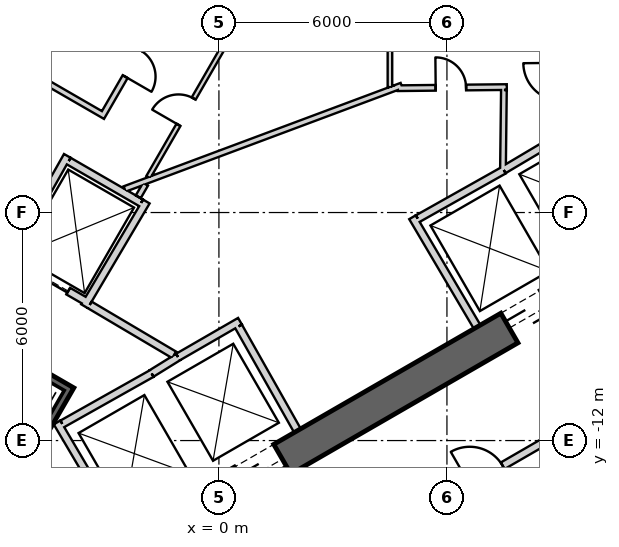
"""IFC4 building model, lengths in metres.
Left out: names, types, materials, properties, quantities, classifications, styles, units other than length and angle.
Written with IfcOpenShell. Run it as: python <this file> out.ifc"""

import sys

from ifc_helpers import new_model, si_unit, direction, frame, frame_2d, origin, place, context, subcontext, project, spatial, rectangle, extrude, element, fill, save


model = new_model("IFC4")
c1 = context("Model", 3, precision=1e-05, world=origin(), true_north=direction((0.0, 1.0)))
c2 = subcontext(c1, "Body", "Model", "MODEL_VIEW")
j1 = project(units=[si_unit("LENGTHUNIT", "METRE"), si_unit("PLANEANGLEUNIT", "RADIAN")], contexts=[c1])
p1 = place(None, origin())
s1 = spatial("IfcSite", under=j1, at=p1, CompositionType="ELEMENT")
p2 = place(p1, origin())
s2 = spatial("IfcBuilding", under=s1, at=p2, CompositionType="ELEMENT")
p3 = place(p2, frame((0.0, 0.0, 404.8)))
s3 = spatial("IfcBuildingStorey", under=s2, at=p3, CompositionType="ELEMENT", Elevation=404.8)
p4 = place(p3, frame((-7.825, -17.97, 0.0), z_axis=(0.0, 0.0, 1.0), x_axis=(0.866028369851, 0.499994862586, 0.0)))
e1 = element("IfcWall", 1, at=p4, inside=s3, PredefinedType="SHEAR", context=c2, shape_type="SweptSolid", body=[
    extrude(rectangle(XDim=31.523, YDim=0.9, at=frame_2d((15.762, 0.0))), origin(), (0.0, 0.0, 1.0), 5.5),
])
p5 = place(p4, frame((7.062, 0.0, 0.0)))
e2 = element("IfcOpeningElement", 2, at=p5, cuts=e1, PredefinedType="OPENING", context=c2, shape_type="SweptSolid", body=[
    extrude(rectangle(XDim=1.2, YDim=2.4, at=frame_2d((0.6, 1.2))), frame((0.0, 0.46, 0.0), z_axis=(0.0, -1.0, 0.0), x_axis=(1.0, 0.0, 0.0)), (0.0, 0.0, 1.0), 0.92),
])
p6 = place(p4, frame((9.762, 0.0, 0.0)))
e3 = element("IfcOpeningElement", 3, at=p6, cuts=e1, PredefinedType="OPENING", context=c2, shape_type="SweptSolid", body=[
    extrude(rectangle(XDim=1.2, YDim=2.4, at=frame_2d((0.6, 1.2))), frame((0.0, 0.46, 0.0), z_axis=(0.0, -1.0, 0.0), x_axis=(1.0, 0.0, 0.0)), (0.0, 0.0, 1.0), 0.92),
])
p7 = place(p4, frame((17.862, 0.0, 0.0)))
e4 = element("IfcOpeningElement", 4, at=p7, cuts=e1, PredefinedType="OPENING", context=c2, shape_type="SweptSolid", body=[
    extrude(rectangle(XDim=1.2, YDim=2.4, at=frame_2d((0.6, 1.2))), frame((0.0, 0.46, 0.0), z_axis=(0.0, -1.0, 0.0), x_axis=(1.0, 0.0, 0.0)), (0.0, 0.0, 1.0), 0.92),
])
p8 = place(p4, frame((20.562, 0.0, 0.0)))
e5 = element("IfcOpeningElement", 5, at=p8, cuts=e1, PredefinedType="OPENING", context=c2, shape_type="SweptSolid", body=[
    extrude(rectangle(XDim=1.2, YDim=2.4, at=frame_2d((0.6, 1.2))), frame((0.0, 0.46, 0.0), z_axis=(0.0, -1.0, 0.0), x_axis=(1.0, 0.0, 0.0)), (0.0, 0.0, 1.0), 0.92),
])
p9 = place(p4, frame((26.712, 0.0, 0.0)))
e6 = element("IfcOpeningElement", 6, at=p9, cuts=e1, PredefinedType="OPENING", context=c2, shape_type="SweptSolid", body=[
    extrude(rectangle(XDim=1.2, YDim=2.4, at=frame_2d((0.6, 1.2))), frame((0.0, 0.46, 0.0), z_axis=(0.0, -1.0, 0.0), x_axis=(1.0, 0.0, 0.0)), (0.0, 0.0, 1.0), 0.92),
])
p10 = place(p4, frame((3.612, 0.0, 0.0)))
e7 = element("IfcOpeningElement", 7, at=p10, cuts=e1, PredefinedType="OPENING", context=c2, shape_type="SweptSolid", body=[
    extrude(rectangle(XDim=1.2, YDim=2.4, at=frame_2d((0.6, 1.2))), frame((0.0, 0.46, 0.0), z_axis=(0.0, -1.0, 0.0), x_axis=(1.0, 0.0, 0.0)), (0.0, 0.0, 1.0), 0.92),
])
p11 = place(p3, frame((-2.558, -14.409, 0.0), z_axis=(0.0, 0.0, 1.0), x_axis=(-0.507997497166, 0.861358544901, 0.0)))
e8 = element("IfcWall", 8, at=p11, inside=s3, PredefinedType="PLUMBINGWALL", context=c2, shape_type="SweptSolid", body=[
    extrude(rectangle(XDim=3.35, YDim=0.2, at=frame_2d((1.675, 0.0))), origin(), (0.0, 0.0, 1.0), 5.25),
])
p12 = place(p3, frame((-1.769, -10.237, 0.0), z_axis=(0.0, 0.0, 1.0), x_axis=(-0.871534483978, -0.490334215854, 0.0)))
e9 = element("IfcWall", 9, at=p12, inside=s3, PredefinedType="PLUMBINGWALL", context=c2, shape_type="SweptSolid", body=[
    extrude(rectangle(XDim=2.7, YDim=0.2, at=frame_2d((1.35, 0.0))), origin(), (0.0, 0.0, 1.0), 5.25),
])
p13 = place(p3, frame((-1.076, -9.803, 0.0), z_axis=(0.0, 0.0, 1.0), x_axis=(-0.850341601995, -0.526231089842, 0.0)))
e10 = element("IfcWall", 10, at=p13, inside=s3, PredefinedType="PLUMBINGWALL", context=c2, shape_type="SweptSolid", body=[
    extrude(rectangle(XDim=0.817, YDim=0.2, at=frame_2d((0.408, 0.0))), origin(), (0.0, 0.0, 1.0), 5.25),
])
p14 = place(p3, frame((-1.077, -9.802, 0.0), z_axis=(0.0, 0.0, 1.0), x_axis=(0.865993522811, 0.500055215401, 0.0)))
e11 = element("IfcWall", 11, at=p14, inside=s3, PredefinedType="PLUMBINGWALL", context=c2, shape_type="SweptSolid", body=[
    extrude(rectangle(XDim=1.884, YDim=0.2, at=frame_2d((0.942, 0.0))), origin(), (0.0, 0.0, 1.0), 5.25),
])
p15 = place(p3, frame((0.517, -8.997, 0.0), z_axis=(0.0, 0.0, 1.0), x_axis=(0.491993409184, -0.87059892334, 0.0)))
e12 = element("IfcWall", 12, at=p15, inside=s3, PredefinedType="PLUMBINGWALL", context=c2, shape_type="SweptSolid", body=[
    extrude(rectangle(XDim=3.15, YDim=0.2, at=frame_2d((1.575, 0.0))), origin(), (0.0, 0.0, 1.0), 5.25),
])
p16 = place(p3, frame((6.795, -9.01, 0.0), z_axis=(0.0, 0.0, 1.0), x_axis=(-0.507997497166, 0.861358544901, 0.0)))
e13 = element("IfcWall", 13, at=p16, inside=s3, PredefinedType="PLUMBINGWALL", context=c2, shape_type="SweptSolid", body=[
    extrude(rectangle(XDim=3.35, YDim=0.2, at=frame_2d((1.675, 0.0))), origin(), (0.0, 0.0, 1.0), 5.25),
])
p17 = place(p3, frame((5.231, -6.161, 0.0), z_axis=(0.0, 0.0, 1.0), x_axis=(0.871540428464, 0.4903236498, 0.0)))
e14 = element("IfcWall", 14, at=p17, inside=s3, PredefinedType="PLUMBINGWALL", context=c2, shape_type="SweptSolid", body=[
    extrude(rectangle(XDim=2.6, YDim=0.2, at=frame_2d((1.3, 0.0))), origin(), (0.0, 0.0, 1.0), 5.25),
])
p18 = place(p3, frame((7.493, -4.878, 0.0), z_axis=(0.0, 0.0, 1.0), x_axis=(0.859981807212, 0.510324691999, 0.0)))
e15 = element("IfcWall", 15, at=p18, inside=s3, PredefinedType="PLUMBINGWALL", context=c2, shape_type="SweptSolid", body=[
    extrude(rectangle(XDim=1.845, YDim=0.2, at=frame_2d((0.922, 0.0))), origin(), (0.0, 0.0, 1.0), 5.25),
])
p19 = place(p3, frame((-3.905, -10.563, -0.3), z_axis=(0.0, 0.0, 1.0), x_axis=(-0.500012932018, -0.866017937352, 0.0)))
e16 = element("IfcWall", 16, at=p19, inside=s3, PredefinedType="SHEAR", context=c2, shape_type="SweptSolid", body=[
    extrude(rectangle(XDim=8.1, YDim=0.2, at=frame_2d((4.05, 0.0))), origin(), (0.0, 0.0, 1.0), 5.55),
])
p20 = place(p3, frame((-4.041, -10.599, -0.3), z_axis=(0.0, 0.0, 1.0), x_axis=(-0.866047807691, 0.499961193289, 0.0)))
e17 = element("IfcWall", 17, at=p20, inside=s3, PredefinedType="SHEAR", context=c2, shape_type="SweptSolid", body=[
    extrude(rectangle(XDim=3.6, YDim=0.2, at=frame_2d((1.8, 0.0))), origin(), (0.0, 0.0, 1.0), 5.55),
])
p21 = place(p20, frame((1.25, 0.0, 0.3)))
e18 = element("IfcOpeningElement", 18, at=p21, cuts=e17, PredefinedType="OPENING", context=c2, shape_type="SweptSolid", body=[
    extrude(rectangle(XDim=1.1, YDim=2.1, at=frame_2d((0.55, 1.05))), frame((0.0, 0.11, 0.0), z_axis=(0.0, -1.0, 0.0), x_axis=(1.0, 0.0, 0.0)), (0.0, 0.0, 1.0), 0.22),
])
p22 = place(p3, frame((-3.446, -8.368, 0.0), z_axis=(0.0, 0.0, 1.0), x_axis=(-0.866024647952, 0.500001309137, 0.0)))
e19 = element("IfcWall", 19, at=p22, inside=s3, PredefinedType="PLUMBINGWALL", context=c2, shape_type="SweptSolid", body=[
    extrude(rectangle(XDim=2.4, YDim=0.2, at=frame_2d((1.2, 0.0))), origin(), (0.0, 0.0, 1.0), 5.25),
])
p23 = place(p22, frame((0.6, 0.0, 0.0)))
e20 = element("IfcOpeningElement", 20, at=p23, cuts=e19, PredefinedType="OPENING", context=c2, shape_type="SweptSolid", body=[
    extrude(rectangle(XDim=1.2, YDim=2.4, at=frame_2d((0.6, 1.2))), frame((0.0, 0.11, 0.0), z_axis=(0.0, -1.0, 0.0), x_axis=(1.0, 0.0, 0.0)), (0.0, 0.0, 1.0), 0.22),
])
p24 = place(p3, frame((-3.953, -4.646, 0.0), z_axis=(0.0, 0.0, 1.0), x_axis=(0.86605622881, -0.499946605688, 0.0)))
e21 = element("IfcWall", 21, at=p24, inside=s3, PredefinedType="PLUMBINGWALL", context=c2, shape_type="SweptSolid", body=[
    extrude(rectangle(XDim=2.2, YDim=0.2, at=frame_2d((1.1, 0.0))), origin(), (0.0, 0.0, 1.0), 5.25),
])
p25 = place(p3, frame((-1.91, -5.71, 0.0), z_axis=(0.0, 0.0, 1.0), x_axis=(-0.508616218331, -0.860993346345, 0.0)))
e22 = element("IfcWall", 22, at=p25, inside=s3, PredefinedType="PLUMBINGWALL", context=c2, shape_type="SweptSolid", body=[
    extrude(rectangle(XDim=3.2, YDim=0.2, at=frame_2d((1.6, 0.0))), origin(), (0.0, 0.0, 1.0), 5.25),
])
p26 = place(p3, frame((-3.99, -4.509, 0.0), z_axis=(0.0, 0.0, 1.0), x_axis=(-0.491358283181, -0.870957540612, 0.0)))
e23 = element("IfcWall", 23, at=p26, inside=s3, PredefinedType="PLUMBINGWALL", context=c2, shape_type="SweptSolid", body=[
    extrude(rectangle(XDim=3.2, YDim=0.2, at=frame_2d((1.6, 0.0))), origin(), (0.0, 0.0, 1.0), 5.25),
])
p27 = place(p3, frame((-3.401, -8.43, 0.0), z_axis=(0.0, 0.0, 1.0), x_axis=(0.860630814782, -0.509229418482, 0.0)))
e24 = element("IfcWall", 24, at=p27, inside=s3, PredefinedType="PARTITIONING", context=c2, shape_type="SweptSolid", body=[
    extrude(rectangle(XDim=2.582, YDim=0.2, at=frame_2d((1.291, 0.0))), origin(), (0.0, 0.0, 1.0), 5.25),
])
p28 = place(p3, frame((4.807, -2.659, 0.0), z_axis=(0.0, 0.0, 1.0), x_axis=(-0.936818342118, -0.349816228714, 0.0)))
e25 = element("IfcWall", 25, at=p28, inside=s3, PredefinedType="PLUMBINGWALL", context=c2, shape_type="SweptSolid", body=[
    extrude(rectangle(XDim=7.78, YDim=0.15, at=frame_2d((3.89, 0.0))), origin(), (0.0, 0.0, 1.0), 5.25),
])
p29 = place(p3, frame((0.182, -1.535, 0.0), z_axis=(0.0, 0.0, 1.0), x_axis=(-0.499988401207, -0.866032100247, 0.0)))
e26 = element("IfcWall", 26, at=p29, inside=s3, PredefinedType="PARTITIONING", context=c2, shape_type="SweptSolid", body=[
    extrude(rectangle(XDim=4.079, YDim=0.12, at=frame_2d((2.04, 0.0))), origin(), (0.0, 0.0, 1.0), 5.25),
])
p30 = place(p29, frame((1.691, 0.0, 0.0)))
e27 = element("IfcOpeningElement", 27, at=p30, cuts=e26, PredefinedType="OPENING", context=c2, shape_type="SweptSolid", body=[
    extrude(rectangle(XDim=0.8, YDim=2.1, at=frame_2d((0.4, 1.05))), frame((0.0, 0.07, 0.0), z_axis=(0.0, -1.0, 0.0), x_axis=(1.0, 0.0, 0.0)), (0.0, 0.0, 1.0), 0.14),
])
p31 = place(p3, frame((4.5, -2.7, 0.0), z_axis=(0.0, 0.0, 1.0), x_axis=(0.0, 1.0, 0.0)))
e28 = element("IfcWall", 28, at=p31, inside=s3, PredefinedType="PARTITIONING", context=c2, shape_type="SweptSolid", body=[
    extrude(rectangle(XDim=1.715, YDim=0.12, at=frame_2d((0.857, 0.0))), origin(), (0.0, 0.0, 1.0), 5.25),
])
p32 = place(p3, frame((-1.932, -5.256, 0.0), z_axis=(0.0, 0.0, 1.0), x_axis=(-0.499777709171, -0.866153705422, 0.0)))
e29 = element("IfcWall", 29, at=p32, inside=s3, PredefinedType="PLUMBINGWALL", context=c2, shape_type="SweptSolid", body=[
    extrude(rectangle(XDim=0.383, YDim=0.15, at=frame_2d((0.191, 0.0))), origin(), (0.0, 0.0, 1.0), 5.25),
])
p33 = place(p3, frame((7.575, -2.699, 0.0), z_axis=(0.0, 0.0, 1.0), x_axis=(-0.999947791603, -0.010218320275, 0.0)))
e30 = element("IfcWall", 30, at=p33, inside=s3, PredefinedType="PLUMBINGWALL", context=c2, shape_type="SweptSolid", body=[
    extrude(rectangle(XDim=2.867, YDim=0.15, at=frame_2d((1.434, 0.0))), origin(), (0.0, 0.0, 1.0), 5.25),
])
p34 = place(p33, frame((1.071, 0.0, 0.0)))
e31 = element("IfcOpeningElement", 31, at=p34, cuts=e30, PredefinedType="OPENING", context=c2, shape_type="SweptSolid", body=[
    extrude(rectangle(XDim=0.8, YDim=2.1, at=frame_2d((0.4, 1.05))), frame((0.0, 0.085, 0.0), z_axis=(0.0, -1.0, 0.0), x_axis=(1.0, 0.0, 0.0)), (0.0, 0.0, 1.0), 0.17),
])
p35 = place(p3, frame((7.475, -4.865, 0.0), z_axis=(0.0, 0.0, 1.0), x_axis=(0.011682810534, 0.99993175364, 0.0)))
e32 = element("IfcWall", 32, at=p35, inside=s3, PredefinedType="PLUMBINGWALL", context=c2, shape_type="SweptSolid", body=[
    extrude(rectangle(XDim=2.09, YDim=0.15, at=frame_2d((1.045, 0.0))), origin(), (0.0, 0.0, 1.0), 5.25),
])
p36 = place(p3, frame((-3.089, -3.5, 0.0), z_axis=(0.0, 0.0, 1.0), x_axis=(0.500025362525, 0.866010760229, 0.0)))
e33 = element("IfcWall", 33, at=p36, inside=s3, PredefinedType="PLUMBINGWALL", context=c2, shape_type="SweptSolid", body=[
    extrude(rectangle(XDim=3.209, YDim=0.15, at=frame_2d((1.604, 0.0))), origin(), (0.0, 0.0, 1.0), 5.25),
])
p37 = place(p36, frame((1.242, 0.0, 0.0)))
e34 = element("IfcOpeningElement", 34, at=p37, cuts=e33, PredefinedType="OPENING", context=c2, shape_type="SweptSolid", body=[
    extrude(rectangle(XDim=0.8, YDim=2.1, at=frame_2d((0.4, 1.05))), frame((0.0, 0.085, 0.0), z_axis=(0.0, -1.0, 0.0), x_axis=(1.0, 0.0, 0.0)), (0.0, 0.0, 1.0), 0.17),
])
p38 = place(p3, frame((-4.91, -2.361, 0.0), z_axis=(0.0, 0.0, 1.0), x_axis=(0.866022705876, -0.500004672885, 0.0)))
e35 = element("IfcWall", 35, at=p38, inside=s3, PredefinedType="PLUMBINGWALL", context=c2, shape_type="SweptSolid", body=[
    extrude(rectangle(XDim=2.072, YDim=0.15, at=frame_2d((1.036, 0.0))), origin(), (0.0, 0.0, 1.0), 5.25),
])
p39 = place(p3, frame((1.009, -16.391, 0.0), z_axis=(0.0, 0.0, 1.0), x_axis=(0.866026744585, 0.499997677658, 0.0)))
e36 = element("IfcWall", 36, at=p39, inside=s3, PredefinedType="PARTITIONING", context=c2, shape_type="SweptSolid", body=[
    extrude(rectangle(XDim=13.617, YDim=0.2, at=frame_2d((6.808, 0.0))), origin(), (0.0, 0.0, 1.0), 5.25),
])
p40 = place(p39, frame((6.456, 0.0, 0.0)))
e37 = element("IfcOpeningElement", 37, at=p40, cuts=e36, PredefinedType="OPENING", context=c2, shape_type="SweptSolid", body=[
    extrude(rectangle(XDim=1.0, YDim=2.1, at=frame_2d((0.5, 1.05))), frame((0.0, 0.11, 0.0), z_axis=(0.0, -1.0, 0.0), x_axis=(1.0, 0.0, 0.0)), (0.0, 0.0, 1.0), 0.22),
])
p41 = place(p23, origin())
e38 = element("IfcDoor", 38, at=p41, inside=s3, OperationType="SLIDING_TO_LEFT", PredefinedType="USERDEFINED", context=c2, shape_type="SweptSolid", body=[
    extrude(rectangle(XDim=1.2, YDim=2.4, at=frame_2d((0.6, 1.2))), frame((0.0, 0.025, 0.0), z_axis=(0.0, -1.0, 0.0), x_axis=(1.0, 0.0, 0.0)), (0.0, 0.0, 1.0), 0.05),
])
fill(e20, e38)
p42 = place(p30, origin())
e39 = element("IfcDoor", 39, at=p42, inside=s3, OperationType="SINGLE_SWING_RIGHT", PredefinedType="USERDEFINED", context=c2, shape_type="SweptSolid", body=[
    extrude(rectangle(XDim=0.8, YDim=2.1, at=frame_2d((0.4, 1.05))), frame((0.0, 0.025, 0.0), z_axis=(0.0, -1.0, 0.0), x_axis=(1.0, 0.0, 0.0)), (0.0, 0.0, 1.0), 0.05),
])
fill(e27, e39)
p43 = place(p34, origin())
e40 = element("IfcDoor", 40, at=p43, inside=s3, OperationType="SINGLE_SWING_RIGHT", PredefinedType="USERDEFINED", context=c2, shape_type="SweptSolid", body=[
    extrude(rectangle(XDim=0.8, YDim=2.1, at=frame_2d((0.4, 1.05))), frame((0.0, 0.025, 0.0), z_axis=(0.0, -1.0, 0.0), x_axis=(1.0, 0.0, 0.0)), (0.0, 0.0, 1.0), 0.05),
])
fill(e31, e40)
p44 = place(p37, origin())
e41 = element("IfcDoor", 41, at=p44, inside=s3, OperationType="SINGLE_SWING_LEFT", PredefinedType="USERDEFINED", context=c2, shape_type="SweptSolid", body=[
    extrude(rectangle(XDim=0.8, YDim=2.1, at=frame_2d((0.4, 1.05))), frame((0.0, 0.025, 0.0), z_axis=(0.0, -1.0, 0.0), x_axis=(1.0, 0.0, 0.0)), (0.0, 0.0, 1.0), 0.05),
])
fill(e34, e41)
p45 = place(p40, origin())
e42 = element("IfcDoor", 42, at=p45, inside=s3, OperationType="SINGLE_SWING_LEFT", PredefinedType="USERDEFINED", context=c2, shape_type="SweptSolid", body=[
    extrude(rectangle(XDim=1.0, YDim=2.1, at=frame_2d((0.5, 1.05))), frame((0.0, 0.025, 0.0), z_axis=(0.0, -1.0, 0.0), x_axis=(1.0, 0.0, 0.0)), (0.0, 0.0, 1.0), 0.05),
])
fill(e37, e42)
p46 = place(p6, origin())
e43 = element("IfcDoor", 43, at=p46, inside=s3, OperationType="SLIDING_TO_LEFT", PredefinedType="USERDEFINED", context=c2, shape_type="SweptSolid", body=[
    extrude(rectangle(XDim=1.2, YDim=2.4, at=frame_2d((0.6, 1.2))), frame((0.0, 0.025, 0.0), z_axis=(0.0, -1.0, 0.0), x_axis=(1.0, 0.0, 0.0)), (0.0, 0.0, 1.0), 0.05),
])
fill(e3, e43)
p47 = place(p7, origin())
e44 = element("IfcDoor", 44, at=p47, inside=s3, OperationType="SLIDING_TO_LEFT", PredefinedType="USERDEFINED", context=c2, shape_type="SweptSolid", body=[
    extrude(rectangle(XDim=1.2, YDim=2.4, at=frame_2d((0.6, 1.2))), frame((0.0, 0.025, 0.0), z_axis=(0.0, -1.0, 0.0), x_axis=(1.0, 0.0, 0.0)), (0.0, 0.0, 1.0), 0.05),
])
fill(e4, e44)
save(model, sys.argv[1])
